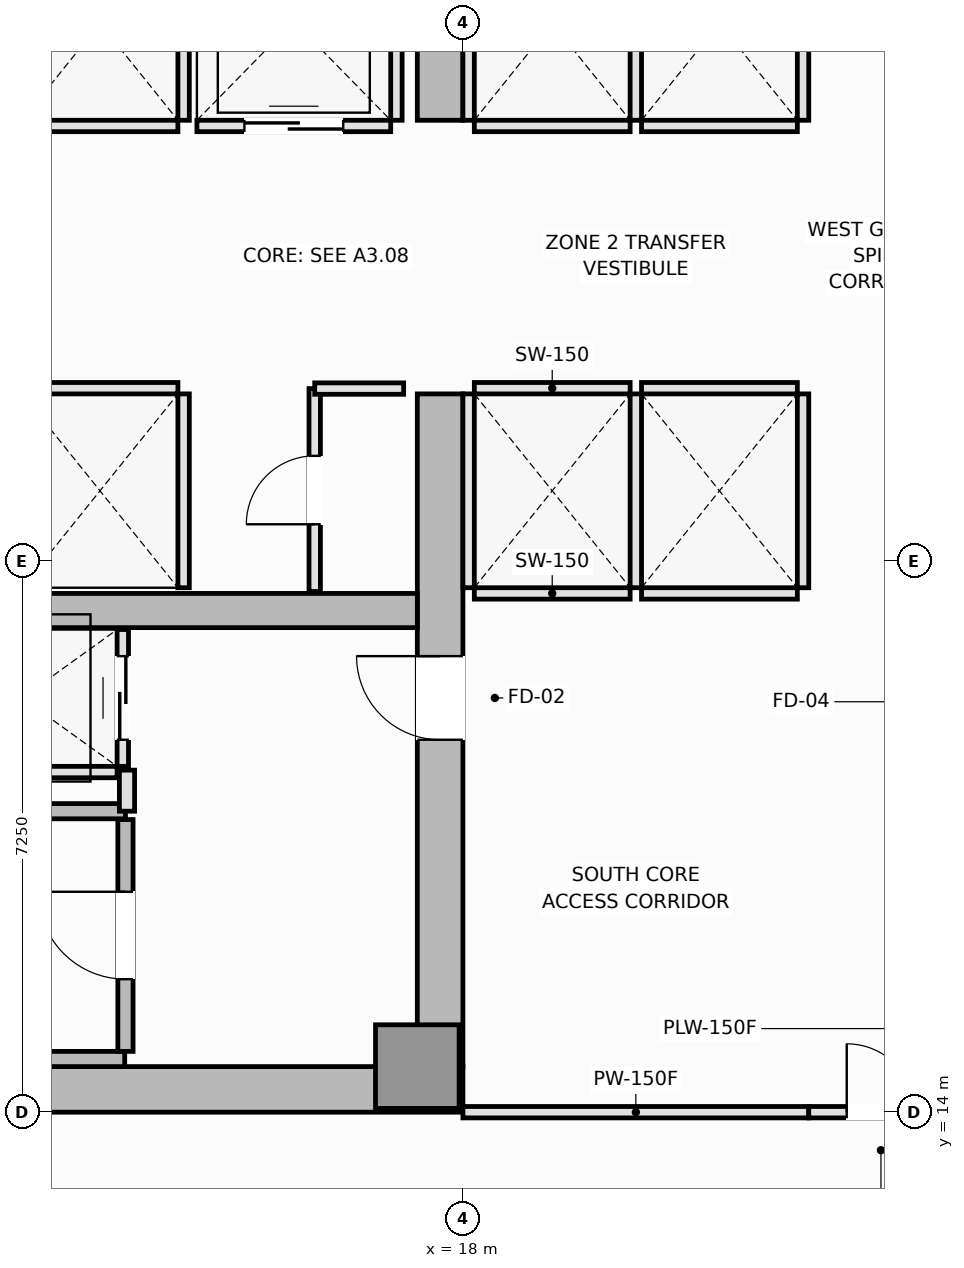
"""IFC4 building model, lengths in metres.
Left out: names, types, materials, properties, quantities, classifications, styles, units other than length and angle.
Written with IfcOpenShell. Run it as: python <this file> out.ifc"""

import sys

from ifc_helpers import new_model, si_unit, direction, frame, frame_2d, origin, origin_2d, place, context, subcontext, project, spatial, rectangle, extrude, element, fill, save


model = new_model("IFC4")
c1 = context("Model", 3, precision=1e-05, world=origin(), true_north=direction((0.0, 1.0)))
c2 = subcontext(c1, "Body", "Model", "MODEL_VIEW")
j1 = project(units=[si_unit("LENGTHUNIT", "METRE"), si_unit("PLANEANGLEUNIT", "RADIAN")], contexts=[c1])
p1 = place(None, origin())
s1 = spatial("IfcSite", under=j1, at=p1, CompositionType="ELEMENT")
p2 = place(p1, origin())
s2 = spatial("IfcBuilding", under=s1, at=p2, CompositionType="ELEMENT")
p3 = place(p2, frame((0.0, 0.0, 102.25)))
s3 = spatial("IfcBuildingStorey", under=s2, at=p3, CompositionType="ELEMENT", Elevation=102.25)
p4 = place(p3, frame((4.5, 14.3, 0.0), z_axis=(0.0, 0.0, 1.0), x_axis=(1.0, 0.0, 0.0)))
e1 = element("IfcWall", 1, at=p4, inside=s3, PredefinedType="SHEAR", context=c2, shape_type="SweptSolid", body=[
    extrude(rectangle(XDim=13.5, YDim=0.6, at=frame_2d((6.75, 0.0))), origin(), (0.0, 0.0, 1.0), 3.55),
])
p5 = place(p3, frame((17.7, 14.6, 0.0), z_axis=(0.0, 0.0, 1.0), x_axis=(0.0, 1.0, 0.0)))
e2 = element("IfcWall", 2, at=p5, inside=s3, PredefinedType="SHEAR", context=c2, shape_type="SweptSolid", body=[
    extrude(rectangle(XDim=8.85, YDim=0.6, at=frame_2d((4.425, 0.0))), origin(), (0.0, 0.0, 1.0), 3.55),
])
p6 = place(p5, frame((4.3, 0.0, 0.0)))
e3 = element("IfcOpeningElement", 3, at=p6, cuts=e2, PredefinedType="OPENING", context=c2, shape_type="SweptSolid", body=[
    extrude(rectangle(XDim=1.1, YDim=2.15, at=frame_2d((0.55, 1.075))), frame((0.0, 0.31, 0.0), z_axis=(0.0, -1.0, 0.0), x_axis=(1.0, 0.0, 0.0)), (0.0, 0.0, 1.0), 0.62),
])
p7 = place(p3, frame((17.7, 27.05, 0.0), z_axis=(0.0, 0.0, 1.0), x_axis=(0.0, 1.0, 0.0)))
e4 = element("IfcWall", 4, at=p7, inside=s3, PredefinedType="SHEAR", context=c2, shape_type="SweptSolid", body=[
    extrude(rectangle(XDim=8.85, YDim=0.6, at=frame_2d((4.425, 0.0))), origin(), (0.0, 0.0, 1.0), 3.55),
])
p8 = place(p7, frame((3.45, 0.0, 0.0)))
e5 = element("IfcOpeningElement", 5, at=p8, cuts=e4, PredefinedType="OPENING", context=c2, shape_type="SweptSolid", body=[
    extrude(rectangle(XDim=1.1, YDim=2.15, at=frame_2d((0.55, 1.075))), frame((0.0, 0.31, 0.0), z_axis=(0.0, -1.0, 0.0), x_axis=(1.0, 0.0, 0.0)), (0.0, 0.0, 1.0), 0.62),
])
p9 = place(p3, frame((5.1, 20.6, 0.0), z_axis=(0.0, 0.0, 1.0), x_axis=(1.0, 0.0, 0.0)))
e6 = element("IfcWall", 6, at=p9, inside=s3, PredefinedType="SHEAR", context=c2, shape_type="SweptSolid", body=[
    extrude(rectangle(XDim=12.3, YDim=0.45, at=frame_2d((6.15, 0.0))), origin(), (0.0, 0.0, 1.0), 3.55),
])
p10 = place(p3, frame((17.4, 14.6, 0.0), z_axis=(0.0, 0.0, 1.0), x_axis=(1.0, 0.0, 0.0)))
e7 = element("IfcColumn", 7, at=p10, inside=s3, PredefinedType="PILASTER", context=c2, shape_type="SweptSolid", body=[
    extrude(rectangle(XDim=1.1, YDim=1.1, at=origin_2d()), origin(), (0.0, 0.0, 1.0), 3.55),
])
p11 = place(p3, frame((5.8, 14.7, 0.0), z_axis=(0.0, 0.0, 1.0), x_axis=(1.0, 0.0, 0.0)))
e8 = element("IfcWall", 8, at=p11, inside=s3, PredefinedType="SOLIDWALL", context=c2, shape_type="SweptSolid", body=[
    extrude(rectangle(XDim=7.75, YDim=0.2, at=frame_2d((3.875, 0.0))), origin(), (0.0, 0.0, 1.0), 3.55),
])
p12 = place(p3, frame((5.9, 17.96, 0.0), z_axis=(0.0, 0.0, 1.0), x_axis=(1.0, 0.0, 0.0)))
e9 = element("IfcWall", 9, at=p12, inside=s3, PredefinedType="SOLIDWALL", context=c2, shape_type="SweptSolid", body=[
    extrude(rectangle(XDim=7.66, YDim=0.2, at=frame_2d((3.83, 0.0))), origin(), (0.0, 0.0, 1.0), 3.55),
])
p13 = place(p3, frame((13.56, 14.8, 0.0), z_axis=(0.0, 0.0, 1.0), x_axis=(0.0, 1.0, 0.0)))
e10 = element("IfcWall", 10, at=p13, inside=s3, PredefinedType="SOLIDWALL", context=c2, shape_type="SweptSolid", body=[
    extrude(rectangle(XDim=3.05, YDim=0.2, at=frame_2d((1.525, 0.0))), origin(), (0.0, 0.0, 1.0), 3.55),
])
p14 = place(p13, frame((0.95, 0.0, 0.0)))
e11 = element("IfcOpeningElement", 11, at=p14, cuts=e10, PredefinedType="OPENING", context=c2, shape_type="SweptSolid", body=[
    extrude(rectangle(XDim=1.15, YDim=2.15, at=frame_2d((0.575, 1.075))), frame((0.0, 0.11, 0.0), z_axis=(0.0, -1.0, 0.0), x_axis=(1.0, 0.0, 0.0)), (0.0, 0.0, 1.0), 0.22),
])
for number, where, z_axis, x_axis in (
    (12, (18.15, 20.825, 0.0), (0.0, 0.0, 1.0), (1.0, 0.0, 0.0)),
    (13, (18.15, 23.525, 0.0), (0.0, 0.0, 1.0), (1.0, 0.0, 0.0)),
):
    element("IfcWall", number, at=place(p3, frame(where, z_axis=z_axis, x_axis=x_axis)), inside=s3, PredefinedType="PARTITIONING", context=c2, shape_type="SweptSolid", body=[
        extrude(rectangle(XDim=2.05, YDim=0.15, at=frame_2d((1.025, 0.0))), origin(), (0.0, 0.0, 1.0), 3.37),
    ])
for number, where, z_axis, x_axis in (
    (14, (18.075, 20.9, 0.0), (0.0, 0.0, 1.0), (0.0, 1.0, 0.0)),
    (15, (20.275, 20.9, 0.0), (0.0, 0.0, 1.0), (0.0, 1.0, 0.0)),
):
    element("IfcWall", number, at=place(p3, frame(where, z_axis=z_axis, x_axis=x_axis)), inside=s3, PredefinedType="PARTITIONING", context=c2, shape_type="SweptSolid", body=[
        extrude(rectangle(XDim=2.55, YDim=0.15, at=frame_2d((1.275, 0.0))), origin(), (0.0, 0.0, 1.0), 3.37),
    ])
for number, where, z_axis, x_axis in (
    (16, (20.35, 20.825, 0.0), (0.0, 0.0, 1.0), (1.0, 0.0, 0.0)),
    (17, (20.35, 23.525, 0.0), (0.0, 0.0, 1.0), (1.0, 0.0, 0.0)),
):
    element("IfcWall", number, at=place(p3, frame(where, z_axis=z_axis, x_axis=x_axis)), inside=s3, PredefinedType="PARTITIONING", context=c2, shape_type="SweptSolid", body=[
        extrude(rectangle(XDim=2.05, YDim=0.15, at=frame_2d((1.025, 0.0))), origin(), (0.0, 0.0, 1.0), 3.37),
    ])
p15 = place(p3, frame((22.475, 20.9, 0.0), z_axis=(0.0, 0.0, 1.0), x_axis=(0.0, 1.0, 0.0)))
e18 = element("IfcWall", 18, at=p15, inside=s3, PredefinedType="PARTITIONING", context=c2, shape_type="SweptSolid", body=[
    extrude(rectangle(XDim=2.55, YDim=0.15, at=frame_2d((1.275, 0.0))), origin(), (0.0, 0.0, 1.0), 3.37),
])
p16 = place(p3, frame((18.15, 26.975, 0.0), z_axis=(0.0, 0.0, 1.0), x_axis=(1.0, 0.0, 0.0)))
e19 = element("IfcWall", 19, at=p16, inside=s3, PredefinedType="PARTITIONING", context=c2, shape_type="SweptSolid", body=[
    extrude(rectangle(XDim=2.05, YDim=0.15, at=frame_2d((1.025, 0.0))), origin(), (0.0, 0.0, 1.0), 3.37),
])
for number, where, z_axis, x_axis in (
    (20, (18.075, 27.05, 0.0), (0.0, 0.0, 1.0), (0.0, 1.0, 0.0)),
    (21, (20.275, 27.05, 0.0), (0.0, 0.0, 1.0), (0.0, 1.0, 0.0)),
):
    element("IfcWall", number, at=place(p3, frame(where, z_axis=z_axis, x_axis=x_axis)), inside=s3, PredefinedType="PARTITIONING", context=c2, shape_type="SweptSolid", body=[
        extrude(rectangle(XDim=2.55, YDim=0.15, at=frame_2d((1.275, 0.0))), origin(), (0.0, 0.0, 1.0), 3.37),
    ])
p17 = place(p3, frame((20.35, 26.975, 0.0), z_axis=(0.0, 0.0, 1.0), x_axis=(1.0, 0.0, 0.0)))
e22 = element("IfcWall", 22, at=p17, inside=s3, PredefinedType="PARTITIONING", context=c2, shape_type="SweptSolid", body=[
    extrude(rectangle(XDim=2.05, YDim=0.15, at=frame_2d((1.025, 0.0))), origin(), (0.0, 0.0, 1.0), 3.37),
])
p18 = place(p3, frame((22.475, 27.05, 0.0), z_axis=(0.0, 0.0, 1.0), x_axis=(0.0, 1.0, 0.0)))
e23 = element("IfcWall", 23, at=p18, inside=s3, PredefinedType="PARTITIONING", context=c2, shape_type="SweptSolid", body=[
    extrude(rectangle(XDim=2.55, YDim=0.15, at=frame_2d((1.275, 0.0))), origin(), (0.0, 0.0, 1.0), 3.37),
])
p19 = place(p3, frame((12.2, 23.525, 0.0), z_axis=(0.0, 0.0, 1.0), x_axis=(1.0, 0.0, 0.0)))
e24 = element("IfcWall", 24, at=p19, inside=s3, PredefinedType="PARTITIONING", context=c2, shape_type="SweptSolid", body=[
    extrude(rectangle(XDim=2.05, YDim=0.15, at=frame_2d((1.025, 0.0))), origin(), (0.0, 0.0, 1.0), 3.37),
])
p20 = place(p3, frame((14.325, 20.9, 0.0), z_axis=(0.0, 0.0, 1.0), x_axis=(0.0, 1.0, 0.0)))
e25 = element("IfcWall", 25, at=p20, inside=s3, PredefinedType="PARTITIONING", context=c2, shape_type="SweptSolid", body=[
    extrude(rectangle(XDim=2.55, YDim=0.15, at=frame_2d((1.275, 0.0))), origin(), (0.0, 0.0, 1.0), 3.37),
])
p21 = place(p3, frame((12.2, 26.975, 0.0), z_axis=(0.0, 0.0, 1.0), x_axis=(1.0, 0.0, 0.0)))
e26 = element("IfcWall", 26, at=p21, inside=s3, PredefinedType="PARTITIONING", context=c2, shape_type="SweptSolid", body=[
    extrude(rectangle(XDim=2.05, YDim=0.15, at=frame_2d((1.025, 0.0))), origin(), (0.0, 0.0, 1.0), 3.37),
])
p22 = place(p3, frame((14.325, 27.05, 0.0), z_axis=(0.0, 0.0, 1.0), x_axis=(0.0, 1.0, 0.0)))
e27 = element("IfcWall", 27, at=p22, inside=s3, PredefinedType="PARTITIONING", context=c2, shape_type="SweptSolid", body=[
    extrude(rectangle(XDim=2.55, YDim=0.15, at=frame_2d((1.275, 0.0))), origin(), (0.0, 0.0, 1.0), 3.37),
])
p23 = place(p3, frame((14.5, 26.975, 0.0), z_axis=(0.0, 0.0, 1.0), x_axis=(1.0, 0.0, 0.0)))
e28 = element("IfcWall", 28, at=p23, inside=s3, PredefinedType="PARTITIONING", context=c2, shape_type="SweptSolid", body=[
    extrude(rectangle(XDim=2.55, YDim=0.15, at=frame_2d((1.275, 0.0))), origin(), (0.0, 0.0, 1.0), 3.37),
])
p24 = place(p23, frame((0.625, 0.0, 0.0)))
e29 = element("IfcOpeningElement", 29, at=p24, cuts=e28, PredefinedType="OPENING", context=c2, shape_type="SweptSolid", body=[
    extrude(rectangle(XDim=1.3, YDim=2.2, at=frame_2d((0.65, 1.1))), frame((0.0, 0.085, 0.0), z_axis=(0.0, -1.0, 0.0), x_axis=(1.0, 0.0, 0.0)), (0.0, 0.0, 1.0), 0.17),
])
p25 = place(p3, frame((17.125, 27.05, 0.0), z_axis=(0.0, 0.0, 1.0), x_axis=(0.0, 1.0, 0.0)))
e30 = element("IfcWall", 30, at=p25, inside=s3, PredefinedType="PARTITIONING", context=c2, shape_type="SweptSolid", body=[
    extrude(rectangle(XDim=2.6, YDim=0.15, at=frame_2d((1.3, 0.0))), origin(), (0.0, 0.0, 1.0), 3.37),
])
p26 = place(p3, frame((10.95, 18.475, 0.0), z_axis=(0.0, 0.0, 1.0), x_axis=(1.0, 0.0, 0.0)))
e31 = element("IfcWall", 31, at=p26, inside=s3, PredefinedType="PARTITIONING", context=c2, shape_type="SweptSolid", body=[
    extrude(rectangle(XDim=2.5, YDim=0.15, at=frame_2d((1.25, 0.0))), origin(), (0.0, 0.0, 1.0), 3.37),
])
p27 = place(p3, frame((13.525, 18.55, 0.0), z_axis=(0.0, 0.0, 1.0), x_axis=(0.0, 1.0, 0.0)))
e32 = element("IfcWall", 32, at=p27, inside=s3, PredefinedType="PARTITIONING", context=c2, shape_type="SweptSolid", body=[
    extrude(rectangle(XDim=1.8, YDim=0.15, at=frame_2d((0.9, 0.0))), origin(), (0.0, 0.0, 1.0), 3.37),
])
p28 = place(p27, frame((0.35, 0.0, 0.0)))
e33 = element("IfcOpeningElement", 33, at=p28, cuts=e32, PredefinedType="OPENING", context=c2, shape_type="SweptSolid", body=[
    extrude(rectangle(XDim=1.1, YDim=2.2, at=frame_2d((0.55, 1.1))), frame((0.0, 0.085, 0.0), z_axis=(0.0, -1.0, 0.0), x_axis=(1.0, 0.0, 0.0)), (0.0, 0.0, 1.0), 0.17),
])
p29 = place(p3, frame((13.58, 17.96, 0.0), z_axis=(0.0, 0.0, 1.0), x_axis=(0.0, 1.0, 0.0)))
e34 = element("IfcWall", 34, at=p29, inside=s3, PredefinedType="PARTITIONING", context=c2, shape_type="SweptSolid", body=[
    extrude(rectangle(XDim=0.54, YDim=0.2, at=frame_2d((0.27, 0.0))), origin(), (0.0, 0.0, 1.0), 3.37),
])
p30 = place(p3, frame((16.05, 20.85, 0.0), z_axis=(0.0, 0.0, 1.0), x_axis=(0.0, 1.0, 0.0)))
e35 = element("IfcWall", 35, at=p30, inside=s3, PredefinedType="PARTITIONING", context=c2, shape_type="SweptSolid", body=[
    extrude(rectangle(XDim=2.67, YDim=0.15, at=frame_2d((1.335, 0.0))), origin(), (0.0, 0.0, 1.0), 3.37),
])
p31 = place(p30, frame((0.885, 0.0, 0.0)))
e36 = element("IfcOpeningElement", 36, at=p31, cuts=e35, PredefinedType="OPENING", context=c2, shape_type="SweptSolid", body=[
    extrude(rectangle(XDim=0.9, YDim=2.1, at=frame_2d((0.45, 1.05))), frame((0.0, 0.085, 0.0), z_axis=(0.0, -1.0, 0.0), x_axis=(1.0, 0.0, 0.0)), (0.0, 0.0, 1.0), 0.17),
])
p32 = place(p3, frame((16.05, 23.52, 0.0), z_axis=(0.0, 0.0, 1.0), x_axis=(1.0, 0.0, 0.0)))
e37 = element("IfcWall", 37, at=p32, inside=s3, PredefinedType="PARTITIONING", context=c2, shape_type="SweptSolid", body=[
    extrude(rectangle(XDim=1.17, YDim=0.15, at=frame_2d((0.585, 0.0))), origin(), (0.0, 0.0, 1.0), 3.37),
])
p33 = place(p3, frame((18.0, 14.0, 0.0), z_axis=(0.0, 0.0, 1.0), x_axis=(1.0, 0.0, 0.0)))
e38 = element("IfcWall", 38, at=p33, inside=s3, PredefinedType="PARTITIONING", context=c2, shape_type="SweptSolid", body=[
    extrude(rectangle(XDim=4.55, YDim=0.15, at=frame_2d((2.275, 0.0))), origin(), (0.0, 0.0, 1.0), 3.37),
])
p34 = place(p3, frame((22.55, 14.0, 0.0), z_axis=(0.0, 0.0, 1.0), x_axis=(1.0, 0.0, 0.0)))
e39 = element("IfcWall", 39, at=p34, inside=s3, PredefinedType="PARTITIONING", context=c2, shape_type="SweptSolid", body=[
    extrude(rectangle(XDim=1.9, YDim=0.15, at=frame_2d((0.95, 0.0))), origin(), (0.0, 0.0, 1.0), 3.37),
])
p35 = place(p34, frame((0.5, 0.0, 0.0)))
e40 = element("IfcOpeningElement", 40, at=p35, cuts=e39, PredefinedType="OPENING", context=c2, shape_type="SweptSolid", body=[
    extrude(rectangle(XDim=0.9, YDim=2.1, at=frame_2d((0.45, 1.05))), frame((0.0, 0.085, 0.0), z_axis=(0.0, -1.0, 0.0), x_axis=(1.0, 0.0, 0.0)), (0.0, 0.0, 1.0), 0.17),
])
p36 = place(p14, origin())
e41 = element("IfcDoor", 41, at=p36, inside=s3, OperationType="SINGLE_SWING_RIGHT", PredefinedType="DOOR", context=c2, shape_type="SweptSolid", body=[
    extrude(rectangle(XDim=1.15, YDim=2.15, at=frame_2d((0.575, 1.075))), frame((0.0, 0.025, 0.0), z_axis=(0.0, -1.0, 0.0), x_axis=(1.0, 0.0, 0.0)), (0.0, 0.0, 1.0), 0.05),
])
fill(e11, e41)
p37 = place(p24, origin())
e42 = element("IfcDoor", 42, at=p37, inside=s3, OperationType="DOUBLE_DOOR_SLIDING", PredefinedType="DOOR", context=c2, shape_type="SweptSolid", body=[
    extrude(rectangle(XDim=1.3, YDim=2.2, at=frame_2d((0.65, 1.1))), frame((0.0, 0.025, 0.0), z_axis=(0.0, -1.0, 0.0), x_axis=(1.0, 0.0, 0.0)), (0.0, 0.0, 1.0), 0.05),
])
fill(e29, e42)
p38 = place(p28, origin())
e43 = element("IfcDoor", 43, at=p38, inside=s3, OperationType="DOUBLE_DOOR_SLIDING", PredefinedType="DOOR", context=c2, shape_type="SweptSolid", body=[
    extrude(rectangle(XDim=1.1, YDim=2.2, at=frame_2d((0.55, 1.1))), frame((0.0, 0.025, 0.0), z_axis=(0.0, -1.0, 0.0), x_axis=(1.0, 0.0, 0.0)), (0.0, 0.0, 1.0), 0.05),
])
fill(e33, e43)
p39 = place(p6, origin())
e44 = element("IfcDoor", 44, at=p39, inside=s3, OperationType="SINGLE_SWING_RIGHT", PredefinedType="DOOR", context=c2, shape_type="SweptSolid", body=[
    extrude(rectangle(XDim=1.1, YDim=2.15, at=frame_2d((0.55, 1.075))), frame((0.0, 0.025, 0.0), z_axis=(0.0, -1.0, 0.0), x_axis=(1.0, 0.0, 0.0)), (0.0, 0.0, 1.0), 0.05),
])
fill(e3, e44)
p40 = place(p31, origin())
e45 = element("IfcDoor", 45, at=p40, inside=s3, OperationType="SINGLE_SWING_LEFT", PredefinedType="DOOR", context=c2, shape_type="SweptSolid", body=[
    extrude(rectangle(XDim=0.9, YDim=2.1, at=frame_2d((0.45, 1.05))), frame((0.0, 0.025, 0.0), z_axis=(0.0, -1.0, 0.0), x_axis=(1.0, 0.0, 0.0)), (0.0, 0.0, 1.0), 0.05),
])
fill(e36, e45)
p41 = place(p35, origin())
e46 = element("IfcDoor", 46, at=p41, inside=s3, OperationType="SINGLE_SWING_LEFT", PredefinedType="DOOR", context=c2, shape_type="SweptSolid", body=[
    extrude(rectangle(XDim=0.9, YDim=2.1, at=frame_2d((0.45, 1.05))), frame((0.0, 0.025, 0.0), z_axis=(0.0, -1.0, 0.0), x_axis=(1.0, 0.0, 0.0)), (0.0, 0.0, 1.0), 0.05),
])
fill(e40, e46)
save(model, sys.argv[1])
